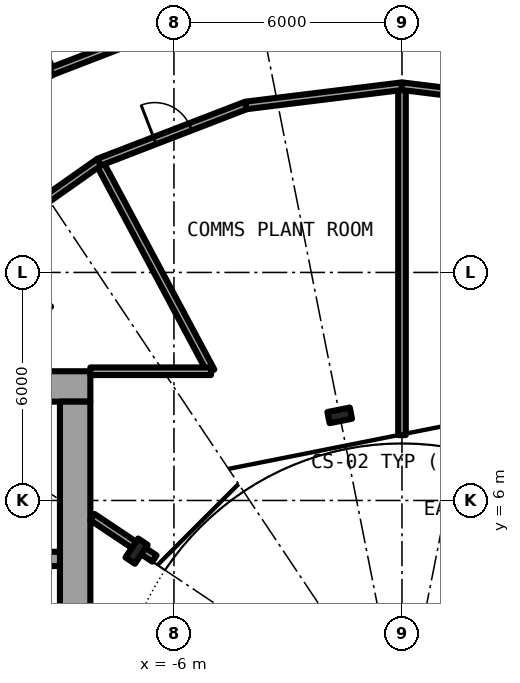
"""IFC4 building model, lengths in metres.
Left out: names, types, materials, properties, quantities, classifications, styles, units other than length and angle.
Written with IfcOpenShell. Run it as: python <this file> out.ifc"""

import sys

from ifc_helpers import new_model, si_unit, direction, frame, frame_2d, origin, origin_2d, place, context, subcontext, project, spatial, rectangle, i_section, extrude, element, fill, save


model = new_model("IFC4")
c1 = context("Model", 3, precision=1e-05, world=origin(), true_north=direction((0.0, 1.0)))
c2 = subcontext(c1, "Body", "Model", "MODEL_VIEW")
j1 = project(units=[si_unit("LENGTHUNIT", "METRE"), si_unit("PLANEANGLEUNIT", "RADIAN")], contexts=[c1])
p1 = place(None, origin())
s1 = spatial("IfcSite", under=j1, at=p1, CompositionType="ELEMENT")
p2 = place(p1, origin())
s2 = spatial("IfcBuilding", under=s1, at=p2, CompositionType="ELEMENT")
p3 = place(p2, frame((0.0, 0.0, 18.3)))
s3 = spatial("IfcBuildingStorey", under=s2, at=p3, CompositionType="ELEMENT", Elevation=18.3)
for number, where, z_axis, x_axis in (
    (1, (-1.639, 8.239, 0.0), (0.0, 0.0, 1.0), (-0.195, 0.981, 0.0)),
    (2, (-6.984, 4.667, 0.0), (0.0, 0.0, 1.0), (-0.831, 0.556, 0.0)),
):
    element("IfcColumn", number, at=place(p3, frame(where, z_axis=z_axis, x_axis=x_axis)), inside=s3, PredefinedType="COLUMN", context=c2, shape_type="SweptSolid", body=[
        extrude(i_section(OverallWidth=0.3, OverallDepth=0.6, WebThickness=0.015, FlangeThickness=0.03, FilletRadius=0.027, at=origin_2d()), origin(), (0.0, 0.0, 1.0), 4.5),
    ])
p4 = place(p3, frame((-8.2, 9.0, 0.0), z_axis=(0.0, 0.0, 1.0), x_axis=(-1.0, 0.0, 0.0)))
e3 = element("IfcWall", 3, at=p4, inside=s3, PredefinedType="SHEAR", context=c2, shape_type="SweptSolid", body=[
    extrude(rectangle(XDim=14.2, YDim=0.8, at=frame_2d((7.1, 0.0))), origin(), (0.0, 0.0, 1.0), 4.5),
])
p5 = place(p4, frame((11.675, 0.0, 0.0)))
e4 = element("IfcOpeningElement", 4, at=p5, cuts=e3, PredefinedType="OPENING", context=c2, shape_type="SweptSolid", body=[
    extrude(rectangle(XDim=1.2, YDim=2.3, at=frame_2d((0.6, 1.15))), frame((0.0, 0.41, 0.0), z_axis=(0.0, -1.0, 0.0), x_axis=(1.0, 0.0, 0.0)), (0.0, 0.0, 1.0), 0.82),
])
p6 = place(p3, frame((-8.6, 8.6, 0.0), z_axis=(0.0, 0.0, 1.0), x_axis=(0.0, -1.0, 0.0)))
e5 = element("IfcWall", 5, at=p6, inside=s3, PredefinedType="SHEAR", context=c2, shape_type="SweptSolid", body=[
    extrude(rectangle(XDim=17.2, YDim=0.8, at=frame_2d((8.6, 0.0))), origin(), (0.0, 0.0, 1.0), 4.5),
])
p7 = place(p6, frame((7.4, 0.0, 0.1)))
e6 = element("IfcOpeningElement", 6, at=p7, cuts=e5, PredefinedType="OPENING", context=c2, shape_type="SweptSolid", body=[
    extrude(rectangle(XDim=2.4, YDim=2.2, at=frame_2d((1.2, 1.1))), frame((0.0, 0.41, 0.0), z_axis=(0.0, -1.0, 0.0), x_axis=(1.0, 0.0, 0.0)), (0.0, 0.0, 1.0), 0.82),
])
p8 = place(p3, frame((-9.0, 4.462, 0.0), z_axis=(0.0, 0.0, 1.0), x_axis=(-1.0, 0.0, 0.0)))
e7 = element("IfcWall", 7, at=p8, inside=s3, PredefinedType="SHEAR", context=c2, shape_type="SweptSolid", body=[
    extrude(rectangle(XDim=10.15, YDim=0.375, at=frame_2d((5.075, 0.0))), origin(), (0.0, 0.0, 1.0), 4.5),
])
p9 = place(p3, frame((-12.813, 23.965, 0.0), z_axis=(0.0, 0.0, 1.0), x_axis=(0.471439510802, -0.881898399848, 0.0)))
e8 = element("IfcWall", 8, at=p9, inside=s3, PredefinedType="PARTITIONING", context=c2, shape_type="SweptSolid", body=[
    extrude(rectangle(XDim=7.575, YDim=0.2, at=frame_2d((3.787, 0.0))), origin(), (0.0, 0.0, 1.0), 4.15),
])
p10 = place(p3, frame((-7.969, 14.903, 0.0), z_axis=(0.0, 0.0, 1.0), x_axis=(0.471532005808, -0.881848948232, 0.0)))
e9 = element("IfcWall", 9, at=p10, inside=s3, PredefinedType="PARTITIONING", context=c2, shape_type="SweptSolid", body=[
    extrude(rectangle(XDim=6.242, YDim=0.2, at=frame_2d((3.121, 0.0))), origin(), (0.0, 0.0, 1.0), 4.15),
])
p11 = place(p3, frame((0.0, 7.72, 0.0), z_axis=(0.0, 0.0, 1.0), x_axis=(0.0, 1.0, 0.0)))
e10 = element("IfcWall", 10, at=p11, inside=s3, PredefinedType="PARTITIONING", context=c2, shape_type="SweptSolid", body=[
    extrude(rectangle(XDim=9.18, YDim=0.2, at=frame_2d((4.59, 0.0))), origin(), (0.0, 0.0, 1.0), 4.15),
])
p12 = place(p3, frame((-6.513, 4.472, 0.0), z_axis=(0.0, 0.0, 1.0), x_axis=(-0.831417956244, 0.555647533996, 0.0)))
e11 = element("IfcWall", 11, at=p12, inside=s3, PredefinedType="PARTITIONING", context=c2, shape_type="SweptSolid", body=[
    extrude(rectangle(XDim=1.962, YDim=0.2, at=frame_2d((0.981, 0.0))), origin(), (0.0, 0.0, 1.0), 4.15),
])
p13 = place(p3, frame((-8.2, 9.4, 0.0), z_axis=(0.0, 0.0, 1.0), x_axis=(1.0, 0.0, 0.0)))
e12 = element("IfcWall", 12, at=p13, inside=s3, PredefinedType="PARTITIONING", context=c2, shape_type="SweptSolid", body=[
    extrude(rectangle(XDim=3.175, YDim=0.2, at=frame_2d((1.587, 0.0))), origin(), (0.0, 0.0, 1.0), 4.15),
])
p14 = place(p3, frame((-11.349, 12.522, 0.0), z_axis=(0.0, 0.0, 1.0), x_axis=(0.817567680547, 0.575832517079, 0.0)))
e13 = element("IfcWall", 13, at=p14, inside=s3, PredefinedType="PARTITIONING", context=c2, shape_type="SweptSolid", body=[
    extrude(rectangle(XDim=4.137, YDim=0.2, at=frame_2d((2.068, 0.0))), origin(), (0.0, 0.0, 1.0), 4.15),
])
p15 = place(p14, frame((1.568, 0.0, 0.0)))
e14 = element("IfcOpeningElement", 14, at=p15, cuts=e13, PredefinedType="OPENING", context=c2, shape_type="SweptSolid", body=[
    extrude(rectangle(XDim=1.0, YDim=2.3, at=frame_2d((0.5, 1.15))), frame((0.0, 0.11, 0.0), z_axis=(0.0, -1.0, 0.0), x_axis=(1.0, 0.0, 0.0)), (0.0, 0.0, 1.0), 0.22),
])
p16 = place(p3, frame((-7.967, 14.904, 0.0), z_axis=(0.0, 0.0, 1.0), x_axis=(0.932943640288, 0.360022449363, 0.0)))
e15 = element("IfcWall", 15, at=p16, inside=s3, PredefinedType="PARTITIONING", context=c2, shape_type="SweptSolid", body=[
    extrude(rectangle(XDim=4.139, YDim=0.2, at=frame_2d((2.069, 0.0))), origin(), (0.0, 0.0, 1.0), 4.15),
])
p17 = place(p16, frame((1.569, 0.0, 0.0)))
e16 = element("IfcOpeningElement", 16, at=p17, cuts=e15, PredefinedType="OPENING", context=c2, shape_type="SweptSolid", body=[
    extrude(rectangle(XDim=1.0, YDim=2.3, at=frame_2d((0.5, 1.15))), frame((0.0, 0.11, 0.0), z_axis=(0.0, -1.0, 0.0), x_axis=(1.0, 0.0, 0.0)), (0.0, 0.0, 1.0), 0.22),
])
for number, where, z_axis, x_axis in (
    (17, (-4.106, 16.394, 0.0), (0.0, 0.0, 1.0), (0.992, 0.122, 0.0)),
    (18, (0.0, 16.9, 0.0), (0.0, 0.0, 1.0), (0.992, -0.122, 0.0)),
):
    element("IfcWall", number, at=place(p3, frame(where, z_axis=z_axis, x_axis=x_axis)), inside=s3, PredefinedType="PARTITIONING", context=c2, shape_type="SweptSolid", body=[
        extrude(rectangle(XDim=4.137, YDim=0.2, at=frame_2d((2.068, 0.0))), origin(), (0.0, 0.0, 1.0), 4.15),
    ])
p18 = place(p3, frame((-10.687, 16.267, 0.0), z_axis=(0.0, 0.0, 1.0), x_axis=(0.817849682833, 0.575431921508, 0.0)))
e19 = element("IfcWall", 19, at=p18, inside=s3, PredefinedType="PARTITIONING", context=c2, shape_type="SweptSolid", body=[
    extrude(rectangle(XDim=1.771, YDim=0.2, at=frame_2d((0.885, 0.0))), origin(), (0.0, 0.0, 1.0), 3.73),
])
p19 = place(p3, frame((-9.239, 17.286, 0.0), z_axis=(0.0, 0.0, 1.0), x_axis=(0.932988479706, 0.359906233255, 0.0)))
e20 = element("IfcWall", 20, at=p19, inside=s3, PredefinedType="PARTITIONING", context=c2, shape_type="SweptSolid", body=[
    extrude(rectangle(XDim=4.799, YDim=0.2, at=frame_2d((2.399, 0.0))), origin(), (0.0, 0.0, 1.0), 3.73),
])
p20 = place(p19, frame((1.899, 0.0, 0.0)))
e21 = element("IfcOpeningElement", 21, at=p20, cuts=e20, PredefinedType="OPENING", context=c2, shape_type="SweptSolid", body=[
    extrude(rectangle(XDim=1.0, YDim=2.3, at=frame_2d((0.5, 1.15))), frame((0.0, 0.11, 0.0), z_axis=(0.0, -1.0, 0.0), x_axis=(1.0, 0.0, 0.0)), (0.0, 0.0, 1.0), 0.22),
])
p21 = place(p17, origin())
e22 = element("IfcDoor", 22, at=p21, inside=s3, OperationType="SINGLE_SWING_RIGHT", PredefinedType="DOOR", context=c2, shape_type="SweptSolid", body=[
    extrude(rectangle(XDim=1.0, YDim=2.3, at=frame_2d((0.5, 1.15))), frame((0.0, 0.025, 0.0), z_axis=(0.0, -1.0, 0.0), x_axis=(1.0, 0.0, 0.0)), (0.0, 0.0, 1.0), 0.05),
])
fill(e16, e22)
save(model, sys.argv[1])
